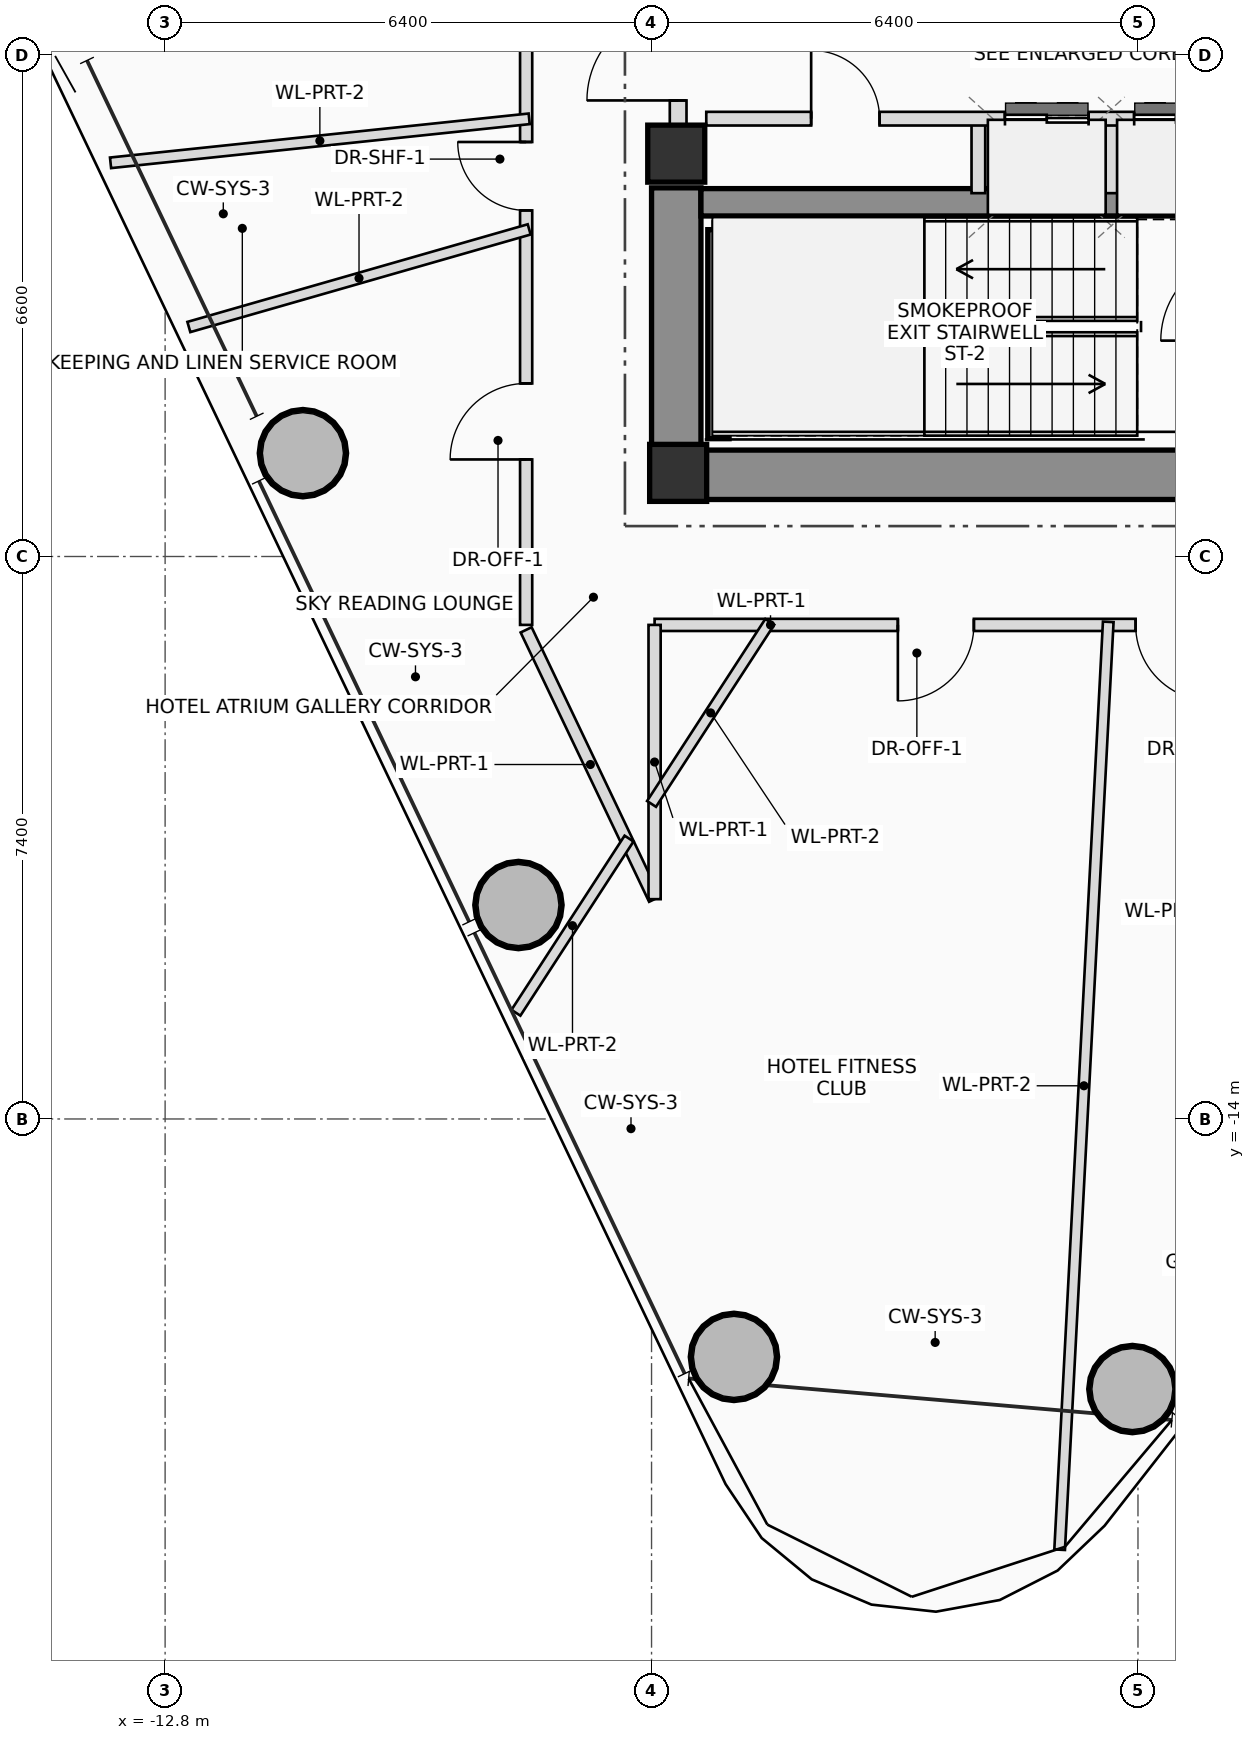
"""IFC4 building model, lengths in metres.
Left out: names, types, materials, properties, quantities, classifications, styles, units other than length and angle.
Written with IfcOpenShell. Run it as: python <this file> out.ifc"""

import sys

from ifc_helpers import new_model, si_unit, direction, frame, frame_2d, origin, origin_2d, place, context, subcontext, project, spatial, rectangle, hollow_circle, extrude, source, transform, mapped, element, fill, save


model = new_model("IFC4")
c1 = context("Model", 3, precision=1e-05, world=origin(), true_north=direction((0.0, 1.0)))
c2 = subcontext(c1, "Body", "Model", "MODEL_VIEW")
j1 = project(units=[si_unit("LENGTHUNIT", "METRE"), si_unit("PLANEANGLEUNIT", "RADIAN")], contexts=[c1])
p1 = place(None, origin())
s1 = spatial("IfcSite", under=j1, at=p1, CompositionType="ELEMENT")
p2 = place(p1, origin())
s2 = spatial("IfcBuilding", under=s1, at=p2, CompositionType="ELEMENT")
p3 = place(p2, frame((0.0, 0.0, 198.35)))
s3 = spatial("IfcBuildingStorey", under=s2, at=p3, CompositionType="ELEMENT", Elevation=198.35)
m1 = source(origin(), c2, "Body", "SweptSolid", [
    extrude(rectangle(XDim=0.75, YDim=0.75, at=origin_2d()), origin(), (0.0, 0.0, 1.0), 3.45),
])
p4 = place(p3, frame((-6.05, -5.5, 0.0), z_axis=(0.0, 0.0, 1.0), x_axis=(1.0, 0.0, 0.0)))
e1 = element("IfcColumn", 1, at=p4, inside=s3, PredefinedType="COLUMN", context=c2, shape_type="MappedRepresentation", body=[
    mapped(m1, transform((0.0, 0.0, 0.0), scale=1.0)),
])
p5 = place(p3, frame((-6.4, -5.525, 0.0), z_axis=(0.0, 0.0, 1.0), x_axis=(1.0, 0.0, 0.0)))
e2 = element("IfcWall", 2, at=p5, inside=s3, PredefinedType="SHEAR", context=c2, shape_type="SweptSolid", body=[
    extrude(rectangle(XDim=12.8, YDim=0.65, at=frame_2d((6.4, 0.0))), origin(), (0.0, 0.0, 1.0), 3.45),
])
p6 = place(p5, frame((8.6, 0.0, 0.0)))
e3 = element("IfcOpeningElement", 3, at=p6, cuts=e2, PredefinedType="OPENING", context=c2, shape_type="SweptSolid", body=[
    extrude(rectangle(XDim=1.2, YDim=2.2, at=frame_2d((0.6, 1.1))), frame((0.0, 0.335, 0.0), z_axis=(0.0, -1.0, 0.0), x_axis=(1.0, 0.0, 0.0)), (0.0, 0.0, 1.0), 0.67),
])
p7 = place(p3, frame((-6.075, -5.2, 0.0), z_axis=(0.0, 0.0, 1.0), x_axis=(0.0, 1.0, 0.0)))
e4 = element("IfcWall", 4, at=p7, inside=s3, PredefinedType="SHEAR", context=c2, shape_type="SweptSolid", body=[
    extrude(rectangle(XDim=3.45, YDim=0.65, at=frame_2d((1.725, 0.0))), origin(), (0.0, 0.0, 1.0), 3.45),
])
p8 = place(p3, frame((-5.75, -1.94, 0.0), z_axis=(0.0, 0.0, 1.0), x_axis=(1.0, 0.0, 0.0)))
e5 = element("IfcWall", 5, at=p8, inside=s3, PredefinedType="SHEAR", context=c2, shape_type="SweptSolid", body=[
    extrude(rectangle(XDim=11.5, YDim=0.36, at=frame_2d((5.75, 0.0))), origin(), (0.0, 0.0, 1.0), 3.45),
])
p9 = place(p3, frame((-5.52, -5.05, 0.0), z_axis=(0.0, 0.0, 1.0), x_axis=(0.0, 1.0, 0.0)))
e6 = element("IfcWall", 6, at=p9, inside=s3, PredefinedType="SHEAR", context=c2, shape_type="SweptSolid", body=[
    extrude(rectangle(XDim=2.75, YDim=0.28, at=frame_2d((1.375, 0.0))), origin(), (0.0, 0.0, 1.0), 3.45),
])
p10 = place(p3, frame((-6.075, -1.3, 0.0), z_axis=(0.0, 0.0, 1.0), x_axis=(1.0, 0.0, 0.0)))
e7 = element("IfcColumn", 7, at=p10, inside=s3, PredefinedType="COLUMN", context=c2, shape_type="MappedRepresentation", body=[
    mapped(m1, transform((0.0, 0.0, 0.0), scale=1.0)),
])
m2 = source(origin(), c2, "Body", "SweptSolid", [
    extrude(hollow_circle(Radius=0.575, WallThickness=0.042, at=origin_2d()), origin(), (0.0, 0.0, 1.0), 3.45),
])
for number, where, z_axis, x_axis in (
    (8, (-0.073, -17.553, 0.0), (0.0, 0.0, 1.0), (1.0, 0.0, 0.0)),
    (9, (-10.987, -5.24, 0.0), (0.0, 0.0, 1.0), (1.0, 0.0, 0.0)),
    (10, (-8.151, -11.185, 0.0), (0.0, 0.0, 1.0), (1.0, 0.0, 0.0)),
    (11, (-5.316, -17.13, 0.0), (0.0, 0.0, 1.0), (1.0, 0.0, 0.0)),
):
    element("IfcColumn", number, at=place(p3, frame(where, z_axis=z_axis, x_axis=x_axis)), inside=s3, PredefinedType="COLUMN", context=c2, shape_type="MappedRepresentation", body=[
        mapped(m2, transform((0.0, 0.0, 0.0), scale=1.0)),
    ])
p11 = place(p3, frame((-6.05, -0.95, 0.0), z_axis=(0.0, 0.0, 1.0), x_axis=(0.0, 1.0, 0.0)))
e12 = element("IfcWall", 12, at=p11, inside=s3, PredefinedType="PLUMBINGWALL", context=c2, shape_type="SweptSolid", body=[
    extrude(rectangle(XDim=1.9, YDim=0.22, at=frame_2d((0.95, 0.0))), origin(), (0.0, 0.0, 1.0), 2.23),
])
p12 = place(p11, frame((0.35, 0.0, 0.0)))
e13 = element("IfcOpeningElement", 13, at=p12, cuts=e12, PredefinedType="OPENING", context=c2, shape_type="SweptSolid", body=[
    extrude(rectangle(XDim=1.2, YDim=2.2, at=frame_2d((0.6, 1.1))), frame((0.0, 0.12, 0.0), z_axis=(0.0, -1.0, 0.0), x_axis=(1.0, 0.0, 0.0)), (0.0, 0.0, 1.0), 0.24),
])
for number, where, z_axis, x_axis in (
    (14, (-2.1, -1.82, 0.0), (0.0, 0.0, 1.0), (0.0, 1.0, 0.0)),
    (15, (-0.35, -1.82, 0.0), (0.0, 0.0, 1.0), (0.0, 1.0, 0.0)),
):
    element("IfcWall", number, at=place(p3, frame(where, z_axis=z_axis, x_axis=x_axis)), inside=s3, PredefinedType="PLUMBINGWALL", context=c2, shape_type="SweptSolid", body=[
        extrude(rectangle(XDim=0.98, YDim=0.18, at=frame_2d((0.49, 0.0))), origin(), (0.0, 0.0, 1.0), 3.25),
    ])
p13 = place(p3, frame((-5.68, -0.84, 0.0), z_axis=(0.0, 0.0, 1.0), x_axis=(1.0, 0.0, 0.0)))
e16 = element("IfcWall", 16, at=p13, inside=s3, PredefinedType="PLUMBINGWALL", context=c2, shape_type="SweptSolid", body=[
    extrude(rectangle(XDim=10.22, YDim=0.18, at=frame_2d((5.11, 0.0))), origin(), (0.0, 0.0, 1.0), 3.25),
])
p14 = place(p13, frame((1.38, 0.0, 0.0)))
e17 = element("IfcOpeningElement", 17, at=p14, cuts=e16, PredefinedType="OPENING", context=c2, shape_type="SweptSolid", body=[
    extrude(rectangle(XDim=0.9, YDim=2.05, at=frame_2d((0.45, 1.025))), frame((0.0, 0.1, 0.0), z_axis=(0.0, -1.0, 0.0), x_axis=(1.0, 0.0, 0.0)), (0.0, 0.0, 1.0), 0.2),
])
p15 = place(p13, frame((3.93, 0.0, 0.0)))
e18 = element("IfcOpeningElement", 18, at=p15, cuts=e16, PredefinedType="OPENING", context=c2, shape_type="SweptSolid", body=[
    extrude(rectangle(XDim=1.1, YDim=2.2, at=frame_2d((0.55, 1.1))), frame((0.0, 0.1, 0.0), z_axis=(0.0, -1.0, 0.0), x_axis=(1.0, 0.0, 0.0)), (0.0, 0.0, 1.0), 0.2),
])
p16 = place(p13, frame((5.63, 0.0, 0.0)))
e19 = element("IfcOpeningElement", 19, at=p16, cuts=e16, PredefinedType="OPENING", context=c2, shape_type="SweptSolid", body=[
    extrude(rectangle(XDim=1.1, YDim=2.2, at=frame_2d((0.55, 1.1))), frame((0.0, 0.1, 0.0), z_axis=(0.0, -1.0, 0.0), x_axis=(1.0, 0.0, 0.0)), (0.0, 0.0, 1.0), 0.2),
])
p17 = place(p13, frame((9.02, 0.0, 0.0)))
e20 = element("IfcOpeningElement", 20, at=p17, cuts=e16, PredefinedType="OPENING", context=c2, shape_type="SweptSolid", body=[
    extrude(rectangle(XDim=0.9, YDim=2.05, at=frame_2d((0.45, 1.025))), frame((0.0, 0.1, 0.0), z_axis=(0.0, -1.0, 0.0), x_axis=(1.0, 0.0, 0.0)), (0.0, 0.0, 1.0), 0.2),
])
p18 = place(p3, frame((-6.36, -11.108, 0.0), z_axis=(0.0, 0.0, 1.0), x_axis=(-0.430493571255, 0.902593643401, 0.0)))
e21 = element("IfcWall", 21, at=p18, inside=s3, PredefinedType="PARTITIONING", context=c2, shape_type="SweptSolid", body=[
    extrude(rectangle(XDim=3.926, YDim=0.16, at=frame_2d((1.963, 0.0))), origin(), (0.0, 0.0, 1.0), 2.605),
])
p19 = place(p3, frame((-8.05, -7.5, 0.0), z_axis=(0.0, 0.0, 1.0), x_axis=(0.0, 1.0, 0.0)))
e22 = element("IfcWall", 22, at=p19, inside=s3, PredefinedType="PARTITIONING", context=c2, shape_type="SweptSolid", body=[
    extrude(rectangle(XDim=15.0, YDim=0.16, at=frame_2d((7.5, 0.0))), origin(), (0.0, 0.0, 1.0), 2.605),
])
p20 = place(p19, frame((2.177, 0.0, 0.0)))
e23 = element("IfcOpeningElement", 23, at=p20, cuts=e22, PredefinedType="OPENING", context=c2, shape_type="SweptSolid", body=[
    extrude(rectangle(XDim=1.0, YDim=2.25, at=frame_2d((0.5, 1.125))), frame((0.0, 0.09, 0.0), z_axis=(0.0, -1.0, 0.0), x_axis=(1.0, 0.0, 0.0)), (0.0, 0.0, 1.0), 0.18),
])
p21 = place(p19, frame((5.453, 0.0, 0.0)))
e24 = element("IfcOpeningElement", 24, at=p21, cuts=e22, PredefinedType="OPENING", context=c2, shape_type="SweptSolid", body=[
    extrude(rectangle(XDim=0.9, YDim=2.05, at=frame_2d((0.45, 1.025))), frame((0.0, 0.09, 0.0), z_axis=(0.0, -1.0, 0.0), x_axis=(1.0, 0.0, 0.0)), (0.0, 0.0, 1.0), 0.18),
])
p22 = place(p19, frame((8.707, 0.0, 0.0)))
e25 = element("IfcOpeningElement", 25, at=p22, cuts=e22, PredefinedType="OPENING", context=c2, shape_type="SweptSolid", body=[
    extrude(rectangle(XDim=1.05, YDim=2.2, at=frame_2d((0.525, 1.1))), frame((0.0, 0.09, 0.0), z_axis=(0.0, -1.0, 0.0), x_axis=(1.0, 0.0, 0.0)), (0.0, 0.0, 1.0), 0.18),
])
p23 = place(p19, frame((12.397, 0.0, 0.0)))
e26 = element("IfcOpeningElement", 26, at=p23, cuts=e22, PredefinedType="OPENING", context=c2, shape_type="SweptSolid", body=[
    extrude(rectangle(XDim=1.0, YDim=2.25, at=frame_2d((0.5, 1.125))), frame((0.0, 0.09, 0.0), z_axis=(0.0, -1.0, 0.0), x_axis=(1.0, 0.0, 0.0)), (0.0, 0.0, 1.0), 0.18),
])
p24 = place(p3, frame((5.25, -7.5, 0.0), z_axis=(0.0, 0.0, 1.0), x_axis=(-1.0, 0.0, 0.0)))
e27 = element("IfcWall", 27, at=p24, inside=s3, PredefinedType="PARTITIONING", context=c2, shape_type="SweptSolid", body=[
    extrude(rectangle(XDim=11.61, YDim=0.16, at=frame_2d((5.805, 0.0))), origin(), (0.0, 0.0, 1.0), 2.605),
])
p25 = place(p24, frame((1.525, 0.0, 0.0)))
e28 = element("IfcOpeningElement", 28, at=p25, cuts=e27, PredefinedType="OPENING", context=c2, shape_type="SweptSolid", body=[
    extrude(rectangle(XDim=1.05, YDim=2.2, at=frame_2d((0.525, 1.1))), frame((0.0, 0.09, 0.0), z_axis=(0.0, -1.0, 0.0), x_axis=(1.0, 0.0, 0.0)), (0.0, 0.0, 1.0), 0.18),
])
p26 = place(p24, frame((4.281, 0.0, 0.0)))
e29 = element("IfcOpeningElement", 29, at=p26, cuts=e27, PredefinedType="OPENING", context=c2, shape_type="SweptSolid", body=[
    extrude(rectangle(XDim=1.0, YDim=2.25, at=frame_2d((0.5, 1.125))), frame((0.0, 0.09, 0.0), z_axis=(0.0, -1.0, 0.0), x_axis=(1.0, 0.0, 0.0)), (0.0, 0.0, 1.0), 0.18),
])
p27 = place(p24, frame((7.409, 0.0, 0.0)))
e30 = element("IfcOpeningElement", 30, at=p27, cuts=e27, PredefinedType="OPENING", context=c2, shape_type="SweptSolid", body=[
    extrude(rectangle(XDim=1.0, YDim=2.25, at=frame_2d((0.5, 1.125))), frame((0.0, 0.09, 0.0), z_axis=(0.0, -1.0, 0.0), x_axis=(1.0, 0.0, 0.0)), (0.0, 0.0, 1.0), 0.18),
])
p28 = place(p3, frame((-6.36, -7.5, 0.0), z_axis=(0.0, 0.0, 1.0), x_axis=(0.0, -1.0, 0.0)))
e31 = element("IfcWall", 31, at=p28, inside=s3, PredefinedType="PARTITIONING", context=c2, shape_type="SweptSolid", body=[
    extrude(rectangle(XDim=3.608, YDim=0.16, at=frame_2d((1.804, 0.0))), origin(), (0.0, 0.0, 1.0), 3.25),
])
p29 = place(p3, frame((-8.01, -0.842, 0.0), z_axis=(0.0, 0.0, 1.0), x_axis=(-0.994518006468, -0.104565457063, 0.0)))
e32 = element("IfcWall", 32, at=p29, inside=s3, PredefinedType="PARTITIONING", context=c2, shape_type="SweptSolid", body=[
    extrude(rectangle(XDim=5.538, YDim=0.14, at=frame_2d((2.769, 0.0))), origin(), (0.0, 0.0, 1.0), 2.765),
])
p30 = place(p3, frame((-8.01, -2.297, 0.0), z_axis=(0.0, 0.0, 1.0), x_axis=(-0.961260451266, -0.275641696467, 0.0)))
e33 = element("IfcWall", 33, at=p30, inside=s3, PredefinedType="PARTITIONING", context=c2, shape_type="SweptSolid", body=[
    extrude(rectangle(XDim=4.658, YDim=0.14, at=frame_2d((2.329, 0.0))), origin(), (0.0, 0.0, 1.0), 2.765),
])
p31 = place(p3, frame((-4.844, -7.46, 0.0), z_axis=(0.0, 0.0, 1.0), x_axis=(-0.544657766351, -0.838658403376, 0.0)))
e34 = element("IfcWall", 34, at=p31, inside=s3, PredefinedType="PARTITIONING", context=c2, shape_type="SweptSolid", body=[
    extrude(rectangle(XDim=2.856, YDim=0.14, at=frame_2d((1.428, 0.0))), origin(), (0.0, 0.0, 1.0), 2.605),
])
p32 = place(p3, frame((-6.696, -10.311, 0.0), z_axis=(0.0, 0.0, 1.0), x_axis=(-0.54459891399, -0.838696621479, 0.0)))
e35 = element("IfcWall", 35, at=p32, inside=s3, PredefinedType="PARTITIONING", context=c2, shape_type="SweptSolid", body=[
    extrude(rectangle(XDim=2.733, YDim=0.14, at=frame_2d((1.366, 0.0))), origin(), (0.0, 0.0, 1.0), 2.765),
])
p33 = place(p3, frame((-0.391, -7.46, 0.0), z_axis=(0.0, 0.0, 1.0), x_axis=(-0.052329252614, -0.998629886054, 0.0)))
e36 = element("IfcWall", 36, at=p33, inside=s3, PredefinedType="PARTITIONING", context=c2, shape_type="SweptSolid", body=[
    extrude(rectangle(XDim=12.224, YDim=0.14, at=frame_2d((6.112, 0.0))), origin(), (0.0, 0.0, 1.0), 2.605),
])
p34 = place(p12, origin())
e37 = element("IfcDoor", 37, at=p34, inside=s3, OperationType="SINGLE_SWING_LEFT", PredefinedType="DOOR", context=c2, shape_type="SweptSolid", body=[
    extrude(rectangle(XDim=1.2, YDim=2.2, at=frame_2d((0.6, 1.1))), frame((0.0, 0.025, 0.0), z_axis=(0.0, -1.0, 0.0), x_axis=(1.0, 0.0, 0.0)), (0.0, 0.0, 1.0), 0.05),
])
fill(e13, e37)
p35 = place(p14, origin())
e38 = element("IfcDoor", 38, at=p35, inside=s3, OperationType="SINGLE_SWING_LEFT", PredefinedType="DOOR", context=c2, shape_type="SweptSolid", body=[
    extrude(rectangle(XDim=0.9, YDim=2.05, at=frame_2d((0.45, 1.025))), frame((0.0, 0.025, 0.0), z_axis=(0.0, -1.0, 0.0), x_axis=(1.0, 0.0, 0.0)), (0.0, 0.0, 1.0), 0.05),
])
fill(e17, e38)
p36 = place(p15, origin())
e39 = element("IfcDoor", 39, at=p36, inside=s3, OperationType="DOUBLE_DOOR_SLIDING", PredefinedType="DOOR", context=c2, shape_type="SweptSolid", body=[
    extrude(rectangle(XDim=1.1, YDim=2.2, at=frame_2d((0.55, 1.1))), frame((0.0, 0.025, 0.0), z_axis=(0.0, -1.0, 0.0), x_axis=(1.0, 0.0, 0.0)), (0.0, 0.0, 1.0), 0.05),
])
fill(e18, e39)
p37 = place(p16, origin())
e40 = element("IfcDoor", 40, at=p37, inside=s3, OperationType="DOUBLE_DOOR_SLIDING", PredefinedType="DOOR", context=c2, shape_type="SweptSolid", body=[
    extrude(rectangle(XDim=1.1, YDim=2.2, at=frame_2d((0.55, 1.1))), frame((0.0, 0.025, 0.0), z_axis=(0.0, -1.0, 0.0), x_axis=(1.0, 0.0, 0.0)), (0.0, 0.0, 1.0), 0.05),
])
fill(e19, e40)
p38 = place(p20, origin())
e41 = element("IfcDoor", 41, at=p38, inside=s3, OperationType="SINGLE_SWING_LEFT", PredefinedType="DOOR", context=c2, shape_type="SweptSolid", body=[
    extrude(rectangle(XDim=1.0, YDim=2.25, at=frame_2d((0.5, 1.125))), frame((0.0, 0.025, 0.0), z_axis=(0.0, -1.0, 0.0), x_axis=(1.0, 0.0, 0.0)), (0.0, 0.0, 1.0), 0.05),
])
fill(e23, e41)
p39 = place(p21, origin())
e42 = element("IfcDoor", 42, at=p39, inside=s3, OperationType="SINGLE_SWING_RIGHT", PredefinedType="DOOR", context=c2, shape_type="SweptSolid", body=[
    extrude(rectangle(XDim=0.9, YDim=2.05, at=frame_2d((0.45, 1.025))), frame((0.0, 0.025, 0.0), z_axis=(0.0, -1.0, 0.0), x_axis=(1.0, 0.0, 0.0)), (0.0, 0.0, 1.0), 0.05),
])
fill(e24, e42)
p40 = place(p26, origin())
e43 = element("IfcDoor", 43, at=p40, inside=s3, OperationType="SINGLE_SWING_LEFT", PredefinedType="DOOR", context=c2, shape_type="SweptSolid", body=[
    extrude(rectangle(XDim=1.0, YDim=2.25, at=frame_2d((0.5, 1.125))), frame((0.0, 0.025, 0.0), z_axis=(0.0, -1.0, 0.0), x_axis=(1.0, 0.0, 0.0)), (0.0, 0.0, 1.0), 0.05),
])
fill(e29, e43)
p41 = place(p27, origin())
e44 = element("IfcDoor", 44, at=p41, inside=s3, OperationType="SINGLE_SWING_RIGHT", PredefinedType="DOOR", context=c2, shape_type="SweptSolid", body=[
    extrude(rectangle(XDim=1.0, YDim=2.25, at=frame_2d((0.5, 1.125))), frame((0.0, 0.025, 0.0), z_axis=(0.0, -1.0, 0.0), x_axis=(1.0, 0.0, 0.0)), (0.0, 0.0, 1.0), 0.05),
])
fill(e30, e44)
save(model, sys.argv[1])
